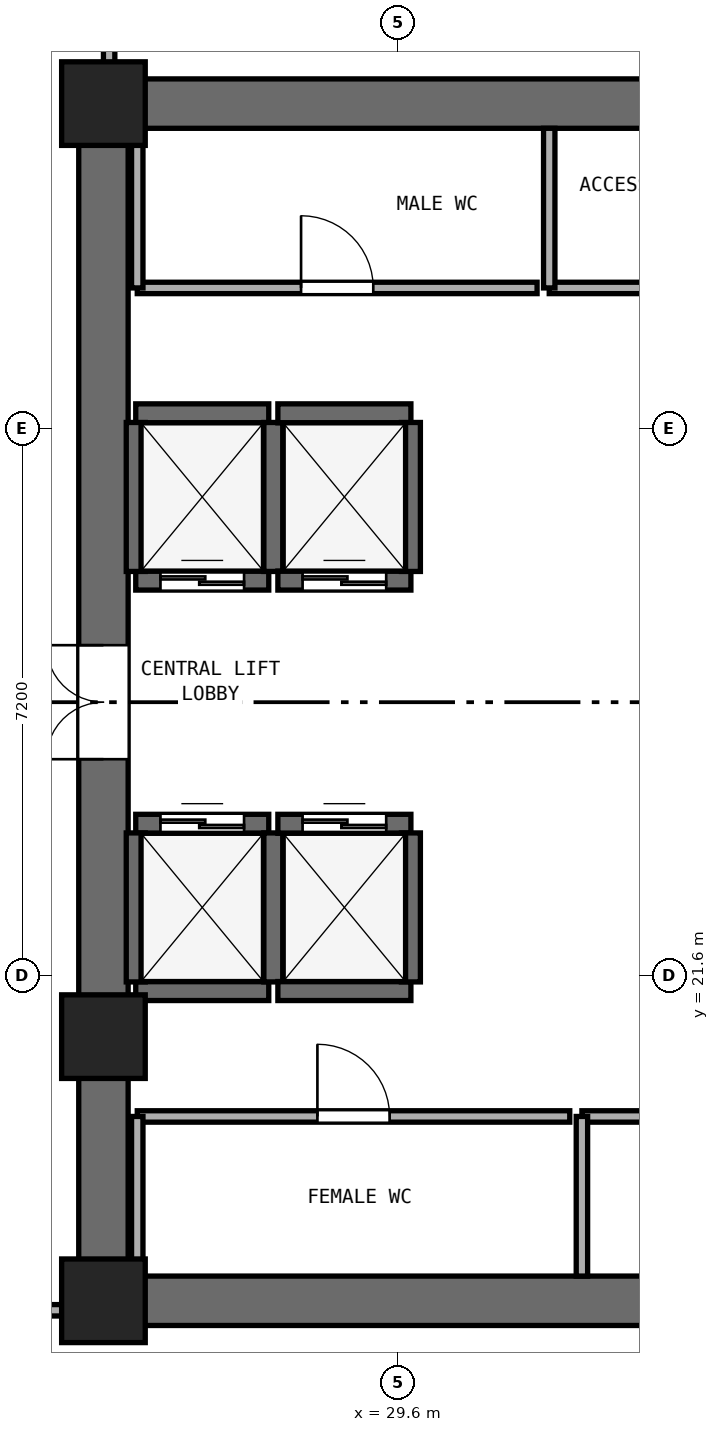
"""IFC4 building model, lengths in metres.
Left out: names, types, materials, properties, quantities, classifications, styles, units other than length and angle.
Written with IfcOpenShell. Run it as: python <this file> out.ifc"""

import sys

from ifc_helpers import new_model, si_unit, direction, frame, frame_2d, origin, origin_2d, place, context, subcontext, project, spatial, rectangle, extrude, element, fill, save


model = new_model("IFC4")
c1 = context("Model", 3, precision=1e-05, world=origin(), true_north=direction((0.0, 1.0)))
c2 = subcontext(c1, "Body", "Model", "MODEL_VIEW")
j1 = project(units=[si_unit("LENGTHUNIT", "METRE"), si_unit("PLANEANGLEUNIT", "RADIAN")], contexts=[c1])
p1 = place(None, origin())
s1 = spatial("IfcSite", under=j1, at=p1, CompositionType="ELEMENT")
p2 = place(p1, origin())
s2 = spatial("IfcBuilding", under=s1, at=p2, CompositionType="ELEMENT")
p3 = place(p2, frame((0.0, 0.0, -9.6)))
s3 = spatial("IfcBuildingStorey", under=s2, at=p3, CompositionType="ELEMENT", Elevation=-9.6)
for number, where, z_axis, x_axis in (
    (1, (25.4, 17.325, 0.0), (0.0, 0.0, 1.0), (1.0, 0.0, 0.0)),
    (2, (25.4, 33.075, 0.0), (0.0, 0.0, 1.0), (1.0, 0.0, 0.0)),
):
    element("IfcWall", number, at=place(p3, frame(where, z_axis=z_axis, x_axis=x_axis)), inside=s3, PredefinedType="SHEAR", context=c2, shape_type="SweptSolid", body=[
        extrude(rectangle(XDim=23.2, YDim=0.65, at=frame_2d((11.6, 0.0))), origin(), (0.0, 0.0, 1.0), 4.45),
    ])
p4 = place(p3, frame((25.725, 17.65, 0.0), z_axis=(0.0, 0.0, 1.0), x_axis=(0.0, 1.0, 0.0)))
e3 = element("IfcWall", 3, at=p4, inside=s3, PredefinedType="SHEAR", context=c2, shape_type="SweptSolid", body=[
    extrude(rectangle(XDim=15.1, YDim=0.65, at=frame_2d((7.55, 0.0))), origin(), (0.0, 0.0, 1.0), 4.45),
])
p5 = place(p4, frame((6.8, 0.0, 0.0)))
e4 = element("IfcOpeningElement", 4, at=p5, cuts=e3, PredefinedType="OPENING", context=c2, shape_type="SweptSolid", body=[
    extrude(rectangle(XDim=1.5, YDim=2.15, at=frame_2d((0.75, 1.075))), frame((0.0, 0.335, 0.0), z_axis=(0.0, -1.0, 0.0), x_axis=(1.0, 0.0, 0.0)), (0.0, 0.0, 1.0), 0.67),
])
for number, where, z_axis, x_axis in (
    (5, (25.725, 17.325, 0.0), (0.0, 0.0, 1.0), (1.0, 0.0, 0.0)),
    (6, (25.725, 33.075, 0.0), (0.0, 0.0, 1.0), (1.0, 0.0, 0.0)),
    (7, (25.725, 20.8, 0.0), (0.0, 0.0, 1.0), (1.0, 0.0, 0.0)),
):
    element("IfcColumn", number, at=place(p3, frame(where, z_axis=z_axis, x_axis=x_axis)), inside=s3, PredefinedType="PILASTER", context=c2, shape_type="SweptSolid", body=[
        extrude(rectangle(XDim=1.1, YDim=1.1, at=origin_2d()), origin(), (0.0, 0.0, 1.0), 4.8),
    ])
p6 = place(p3, frame((26.15, 26.8, 0.0), z_axis=(0.0, 0.0, 1.0), x_axis=(1.0, 0.0, 0.0)))
e8 = element("IfcWall", 8, at=p6, inside=s3, PredefinedType="SHEAR", context=c2, shape_type="SweptSolid", body=[
    extrude(rectangle(XDim=1.75, YDim=0.25, at=frame_2d((0.875, 0.0))), origin(), (0.0, 0.0, 1.0), 4.45),
])
p7 = place(p6, frame((0.325, 0.0, 0.0)))
e9 = element("IfcOpeningElement", 9, at=p7, cuts=e8, PredefinedType="OPENING", context=c2, shape_type="SweptSolid", body=[
    extrude(rectangle(XDim=1.1, YDim=2.15, at=frame_2d((0.55, 1.075))), frame((0.0, 0.135, 0.0), z_axis=(0.0, -1.0, 0.0), x_axis=(1.0, 0.0, 0.0)), (0.0, 0.0, 1.0), 0.27),
])
p8 = place(p3, frame((26.15, 29.0, 0.0), z_axis=(0.0, 0.0, 1.0), x_axis=(1.0, 0.0, 0.0)))
e10 = element("IfcWall", 10, at=p8, inside=s3, PredefinedType="SHEAR", context=c2, shape_type="SweptSolid", body=[
    extrude(rectangle(XDim=1.75, YDim=0.25, at=frame_2d((0.875, 0.0))), origin(), (0.0, 0.0, 1.0), 4.45),
])
for number, where, z_axis, x_axis in (
    (11, (26.15, 26.92, 0.0), (0.0, 0.0, 1.0), (0.0, 1.0, 0.0)),
    (12, (27.96, 26.92, 0.0), (0.0, 0.0, 1.0), (0.0, 1.0, 0.0)),
):
    element("IfcWall", number, at=place(p3, frame(where, z_axis=z_axis, x_axis=x_axis)), inside=s3, PredefinedType="SHEAR", context=c2, shape_type="SweptSolid", body=[
        extrude(rectangle(XDim=1.96, YDim=0.25, at=frame_2d((0.98, 0.0))), origin(), (0.0, 0.0, 1.0), 4.45),
    ])
p9 = place(p3, frame((28.02, 26.8, 0.0), z_axis=(0.0, 0.0, 1.0), x_axis=(1.0, 0.0, 0.0)))
e13 = element("IfcWall", 13, at=p9, inside=s3, PredefinedType="SHEAR", context=c2, shape_type="SweptSolid", body=[
    extrude(rectangle(XDim=1.75, YDim=0.25, at=frame_2d((0.875, 0.0))), origin(), (0.0, 0.0, 1.0), 4.45),
])
p10 = place(p9, frame((0.325, 0.0, 0.0)))
e14 = element("IfcOpeningElement", 14, at=p10, cuts=e13, PredefinedType="OPENING", context=c2, shape_type="SweptSolid", body=[
    extrude(rectangle(XDim=1.1, YDim=2.15, at=frame_2d((0.55, 1.075))), frame((0.0, 0.135, 0.0), z_axis=(0.0, -1.0, 0.0), x_axis=(1.0, 0.0, 0.0)), (0.0, 0.0, 1.0), 0.27),
])
p11 = place(p3, frame((28.02, 29.0, 0.0), z_axis=(0.0, 0.0, 1.0), x_axis=(1.0, 0.0, 0.0)))
e15 = element("IfcWall", 15, at=p11, inside=s3, PredefinedType="SHEAR", context=c2, shape_type="SweptSolid", body=[
    extrude(rectangle(XDim=1.75, YDim=0.25, at=frame_2d((0.875, 0.0))), origin(), (0.0, 0.0, 1.0), 4.45),
])
p12 = place(p3, frame((29.77, 26.92, 0.0), z_axis=(0.0, 0.0, 1.0), x_axis=(0.0, 1.0, 0.0)))
e16 = element("IfcWall", 16, at=p12, inside=s3, PredefinedType="SHEAR", context=c2, shape_type="SweptSolid", body=[
    extrude(rectangle(XDim=1.96, YDim=0.25, at=frame_2d((0.98, 0.0))), origin(), (0.0, 0.0, 1.0), 4.45),
])
p13 = place(p3, frame((26.15, 21.4, 0.0), z_axis=(0.0, 0.0, 1.0), x_axis=(1.0, 0.0, 0.0)))
e17 = element("IfcWall", 17, at=p13, inside=s3, PredefinedType="SHEAR", context=c2, shape_type="SweptSolid", body=[
    extrude(rectangle(XDim=1.75, YDim=0.25, at=frame_2d((0.875, 0.0))), origin(), (0.0, 0.0, 1.0), 4.45),
])
p14 = place(p3, frame((26.15, 23.6, 0.0), z_axis=(0.0, 0.0, 1.0), x_axis=(1.0, 0.0, 0.0)))
e18 = element("IfcWall", 18, at=p14, inside=s3, PredefinedType="SHEAR", context=c2, shape_type="SweptSolid", body=[
    extrude(rectangle(XDim=1.75, YDim=0.25, at=frame_2d((0.875, 0.0))), origin(), (0.0, 0.0, 1.0), 4.45),
])
p15 = place(p14, frame((0.325, 0.0, 0.0)))
e19 = element("IfcOpeningElement", 19, at=p15, cuts=e18, PredefinedType="OPENING", context=c2, shape_type="SweptSolid", body=[
    extrude(rectangle(XDim=1.1, YDim=2.15, at=frame_2d((0.55, 1.075))), frame((0.0, 0.135, 0.0), z_axis=(0.0, -1.0, 0.0), x_axis=(1.0, 0.0, 0.0)), (0.0, 0.0, 1.0), 0.27),
])
for number, where, z_axis, x_axis in (
    (20, (26.15, 21.52, 0.0), (0.0, 0.0, 1.0), (0.0, 1.0, 0.0)),
    (21, (27.96, 21.52, 0.0), (0.0, 0.0, 1.0), (0.0, 1.0, 0.0)),
):
    element("IfcWall", number, at=place(p3, frame(where, z_axis=z_axis, x_axis=x_axis)), inside=s3, PredefinedType="SHEAR", context=c2, shape_type="SweptSolid", body=[
        extrude(rectangle(XDim=1.96, YDim=0.25, at=frame_2d((0.98, 0.0))), origin(), (0.0, 0.0, 1.0), 4.45),
    ])
p16 = place(p3, frame((28.02, 21.4, 0.0), z_axis=(0.0, 0.0, 1.0), x_axis=(1.0, 0.0, 0.0)))
e22 = element("IfcWall", 22, at=p16, inside=s3, PredefinedType="SHEAR", context=c2, shape_type="SweptSolid", body=[
    extrude(rectangle(XDim=1.75, YDim=0.25, at=frame_2d((0.875, 0.0))), origin(), (0.0, 0.0, 1.0), 4.45),
])
p17 = place(p3, frame((28.02, 23.6, 0.0), z_axis=(0.0, 0.0, 1.0), x_axis=(1.0, 0.0, 0.0)))
e23 = element("IfcWall", 23, at=p17, inside=s3, PredefinedType="SHEAR", context=c2, shape_type="SweptSolid", body=[
    extrude(rectangle(XDim=1.75, YDim=0.25, at=frame_2d((0.875, 0.0))), origin(), (0.0, 0.0, 1.0), 4.45),
])
p18 = place(p17, frame((0.325, 0.0, 0.0)))
e24 = element("IfcOpeningElement", 24, at=p18, cuts=e23, PredefinedType="OPENING", context=c2, shape_type="SweptSolid", body=[
    extrude(rectangle(XDim=1.1, YDim=2.15, at=frame_2d((0.55, 1.075))), frame((0.0, 0.135, 0.0), z_axis=(0.0, -1.0, 0.0), x_axis=(1.0, 0.0, 0.0)), (0.0, 0.0, 1.0), 0.27),
])
p19 = place(p3, frame((29.77, 21.52, 0.0), z_axis=(0.0, 0.0, 1.0), x_axis=(0.0, 1.0, 0.0)))
e25 = element("IfcWall", 25, at=p19, inside=s3, PredefinedType="SHEAR", context=c2, shape_type="SweptSolid", body=[
    extrude(rectangle(XDim=1.96, YDim=0.25, at=frame_2d((0.98, 0.0))), origin(), (0.0, 0.0, 1.0), 4.45),
])
p20 = place(p3, frame((26.17, 30.65, 0.0), z_axis=(0.0, 0.0, 1.0), x_axis=(1.0, 0.0, 0.0)))
e26 = element("IfcWall", 26, at=p20, inside=s3, PredefinedType="PARTITIONING", context=c2, shape_type="SweptSolid", body=[
    extrude(rectangle(XDim=5.26, YDim=0.15, at=frame_2d((2.63, 0.0))), origin(), (0.0, 0.0, 1.0), 4.45),
])
p21 = place(p20, frame((2.155, 0.0, 0.0)))
e27 = element("IfcOpeningElement", 27, at=p21, cuts=e26, PredefinedType="OPENING", context=c2, shape_type="SweptSolid", body=[
    extrude(rectangle(XDim=0.95, YDim=2.1, at=frame_2d((0.475, 1.05))), frame((0.0, 0.085, 0.0), z_axis=(0.0, -1.0, 0.0), x_axis=(1.0, 0.0, 0.0)), (0.0, 0.0, 1.0), 0.17),
])
p22 = place(p3, frame((26.17, 30.65, 0.0), z_axis=(0.0, 0.0, 1.0), x_axis=(0.0, 1.0, 0.0)))
e28 = element("IfcWall", 28, at=p22, inside=s3, PredefinedType="PARTITIONING", context=c2, shape_type="SweptSolid", body=[
    extrude(rectangle(XDim=2.1, YDim=0.15, at=frame_2d((1.05, 0.0))), origin(), (0.0, 0.0, 1.0), 4.45),
])
p23 = place(p3, frame((31.59, 30.65, 0.0), z_axis=(0.0, 0.0, 1.0), x_axis=(1.0, 0.0, 0.0)))
e29 = element("IfcWall", 29, at=p23, inside=s3, PredefinedType="PARTITIONING", context=c2, shape_type="SweptSolid", body=[
    extrude(rectangle(XDim=5.26, YDim=0.15, at=frame_2d((2.63, 0.0))), origin(), (0.0, 0.0, 1.0), 4.45),
])
p24 = place(p23, frame((2.155, 0.0, 0.0)))
e30 = element("IfcOpeningElement", 30, at=p24, cuts=e29, PredefinedType="OPENING", context=c2, shape_type="SweptSolid", body=[
    extrude(rectangle(XDim=0.95, YDim=2.1, at=frame_2d((0.475, 1.05))), frame((0.0, 0.085, 0.0), z_axis=(0.0, -1.0, 0.0), x_axis=(1.0, 0.0, 0.0)), (0.0, 0.0, 1.0), 0.17),
])
p25 = place(p3, frame((31.59, 30.65, 0.0), z_axis=(0.0, 0.0, 1.0), x_axis=(0.0, 1.0, 0.0)))
e31 = element("IfcWall", 31, at=p25, inside=s3, PredefinedType="PARTITIONING", context=c2, shape_type="SweptSolid", body=[
    extrude(rectangle(XDim=2.1, YDim=0.15, at=frame_2d((1.05, 0.0))), origin(), (0.0, 0.0, 1.0), 4.45),
])
p26 = place(p3, frame((26.17, 19.75, 0.0), z_axis=(0.0, 0.0, 1.0), x_axis=(1.0, 0.0, 0.0)))
e32 = element("IfcWall", 32, at=p26, inside=s3, PredefinedType="PARTITIONING", context=c2, shape_type="SweptSolid", body=[
    extrude(rectangle(XDim=5.69, YDim=0.15, at=frame_2d((2.845, 0.0))), origin(), (0.0, 0.0, 1.0), 4.45),
])
p27 = place(p26, frame((2.37, 0.0, 0.0)))
e33 = element("IfcOpeningElement", 33, at=p27, cuts=e32, PredefinedType="OPENING", context=c2, shape_type="SweptSolid", body=[
    extrude(rectangle(XDim=0.95, YDim=2.1, at=frame_2d((0.475, 1.05))), frame((0.0, 0.085, 0.0), z_axis=(0.0, -1.0, 0.0), x_axis=(1.0, 0.0, 0.0)), (0.0, 0.0, 1.0), 0.17),
])
p28 = place(p3, frame((26.17, 17.65, 0.0), z_axis=(0.0, 0.0, 1.0), x_axis=(0.0, 1.0, 0.0)))
e34 = element("IfcWall", 34, at=p28, inside=s3, PredefinedType="PARTITIONING", context=c2, shape_type="SweptSolid", body=[
    extrude(rectangle(XDim=2.1, YDim=0.15, at=frame_2d((1.05, 0.0))), origin(), (0.0, 0.0, 1.0), 4.45),
])
p29 = place(p3, frame((32.02, 19.75, 0.0), z_axis=(0.0, 0.0, 1.0), x_axis=(1.0, 0.0, 0.0)))
e35 = element("IfcWall", 35, at=p29, inside=s3, PredefinedType="PARTITIONING", context=c2, shape_type="SweptSolid", body=[
    extrude(rectangle(XDim=4.83, YDim=0.15, at=frame_2d((2.415, 0.0))), origin(), (0.0, 0.0, 1.0), 4.45),
])
p30 = place(p29, frame((1.965, 0.0, 0.0)))
e36 = element("IfcOpeningElement", 36, at=p30, cuts=e35, PredefinedType="OPENING", context=c2, shape_type="SweptSolid", body=[
    extrude(rectangle(XDim=0.9, YDim=2.1, at=frame_2d((0.45, 1.05))), frame((0.0, 0.085, 0.0), z_axis=(0.0, -1.0, 0.0), x_axis=(1.0, 0.0, 0.0)), (0.0, 0.0, 1.0), 0.17),
])
p31 = place(p3, frame((32.02, 17.65, 0.0), z_axis=(0.0, 0.0, 1.0), x_axis=(0.0, 1.0, 0.0)))
e37 = element("IfcWall", 37, at=p31, inside=s3, PredefinedType="PARTITIONING", context=c2, shape_type="SweptSolid", body=[
    extrude(rectangle(XDim=2.1, YDim=0.15, at=frame_2d((1.05, 0.0))), origin(), (0.0, 0.0, 1.0), 4.45),
])
p32 = place(p3, frame((25.8, 33.54, 0.0), z_axis=(0.0, 0.0, 1.0), x_axis=(0.0, 1.0, 0.0)))
e38 = element("IfcWall", 38, at=p32, inside=s3, PredefinedType="PARTITIONING", context=c2, shape_type="SweptSolid", body=[
    extrude(rectangle(XDim=3.96, YDim=0.15, at=frame_2d((1.98, 0.0))), origin(), (0.0, 0.0, 1.0), 4.45),
])
p33 = place(p3, frame((22.96, 17.2, 0.0), z_axis=(0.0, 0.0, 1.0), x_axis=(1.0, 0.0, 0.0)))
e39 = element("IfcWall", 39, at=p33, inside=s3, PredefinedType="PARTITIONING", context=c2, shape_type="SweptSolid", body=[
    extrude(rectangle(XDim=2.3, YDim=0.15, at=frame_2d((1.15, 0.0))), origin(), (0.0, 0.0, 1.0), 4.45),
])
p34 = place(p7, origin())
e40 = element("IfcDoor", 40, at=p34, inside=s3, OperationType="DOUBLE_DOOR_SLIDING", PredefinedType="DOOR", context=c2, shape_type="SweptSolid", body=[
    extrude(rectangle(XDim=1.1, YDim=2.15, at=frame_2d((0.55, 1.075))), frame((0.0, 0.025, 0.0), z_axis=(0.0, -1.0, 0.0), x_axis=(1.0, 0.0, 0.0)), (0.0, 0.0, 1.0), 0.05),
])
fill(e9, e40)
p35 = place(p10, origin())
e41 = element("IfcDoor", 41, at=p35, inside=s3, OperationType="DOUBLE_DOOR_SLIDING", PredefinedType="DOOR", context=c2, shape_type="SweptSolid", body=[
    extrude(rectangle(XDim=1.1, YDim=2.15, at=frame_2d((0.55, 1.075))), frame((0.0, 0.025, 0.0), z_axis=(0.0, -1.0, 0.0), x_axis=(1.0, 0.0, 0.0)), (0.0, 0.0, 1.0), 0.05),
])
fill(e14, e41)
p36 = place(p15, origin())
e42 = element("IfcDoor", 42, at=p36, inside=s3, OperationType="DOUBLE_DOOR_SLIDING", PredefinedType="DOOR", context=c2, shape_type="SweptSolid", body=[
    extrude(rectangle(XDim=1.1, YDim=2.15, at=frame_2d((0.55, 1.075))), frame((0.0, 0.025, 0.0), z_axis=(0.0, -1.0, 0.0), x_axis=(1.0, 0.0, 0.0)), (0.0, 0.0, 1.0), 0.05),
])
fill(e19, e42)
p37 = place(p18, origin())
e43 = element("IfcDoor", 43, at=p37, inside=s3, OperationType="DOUBLE_DOOR_SLIDING", PredefinedType="DOOR", context=c2, shape_type="SweptSolid", body=[
    extrude(rectangle(XDim=1.1, YDim=2.15, at=frame_2d((0.55, 1.075))), frame((0.0, 0.025, 0.0), z_axis=(0.0, -1.0, 0.0), x_axis=(1.0, 0.0, 0.0)), (0.0, 0.0, 1.0), 0.05),
])
fill(e24, e43)
p38 = place(p5, origin())
e44 = element("IfcDoor", 44, at=p38, inside=s3, OperationType="DOUBLE_DOOR_SINGLE_SWING", PredefinedType="DOOR", context=c2, shape_type="SweptSolid", body=[
    extrude(rectangle(XDim=1.5, YDim=2.15, at=frame_2d((0.75, 1.075))), frame((0.0, 0.025, 0.0), z_axis=(0.0, -1.0, 0.0), x_axis=(1.0, 0.0, 0.0)), (0.0, 0.0, 1.0), 0.05),
])
fill(e4, e44)
p39 = place(p21, origin())
e45 = element("IfcDoor", 45, at=p39, inside=s3, OperationType="SINGLE_SWING_LEFT", PredefinedType="DOOR", context=c2, shape_type="SweptSolid", body=[
    extrude(rectangle(XDim=0.95, YDim=2.1, at=frame_2d((0.475, 1.05))), frame((0.0, 0.025, 0.0), z_axis=(0.0, -1.0, 0.0), x_axis=(1.0, 0.0, 0.0)), (0.0, 0.0, 1.0), 0.05),
])
fill(e27, e45)
p40 = place(p27, origin())
e46 = element("IfcDoor", 46, at=p40, inside=s3, OperationType="SINGLE_SWING_LEFT", PredefinedType="DOOR", context=c2, shape_type="SweptSolid", body=[
    extrude(rectangle(XDim=0.95, YDim=2.1, at=frame_2d((0.475, 1.05))), frame((0.0, 0.025, 0.0), z_axis=(0.0, -1.0, 0.0), x_axis=(1.0, 0.0, 0.0)), (0.0, 0.0, 1.0), 0.05),
])
fill(e33, e46)
save(model, sys.argv[1])
